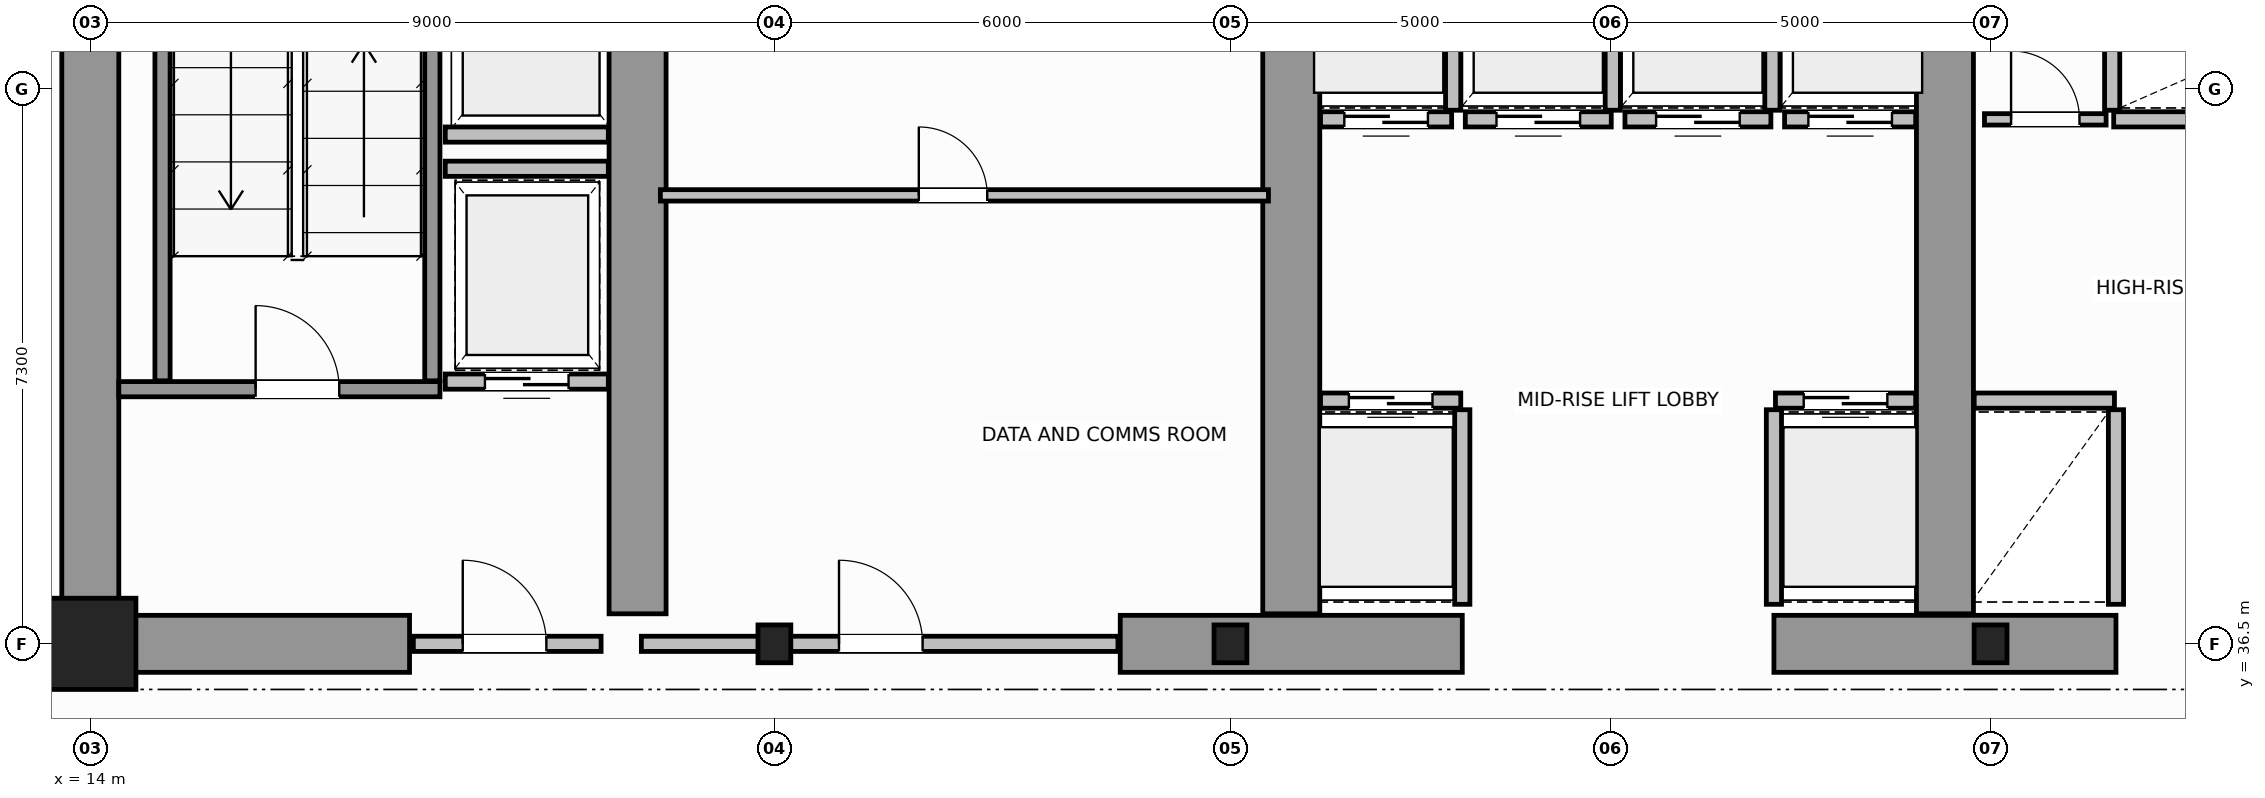
"""IFC4 building model, lengths in metres.
Left out: names, types, materials, properties, quantities, classifications, styles, units other than length and angle.
Written with IfcOpenShell. Run it as: python <this file> out.ifc"""

import sys

from ifc_helpers import new_model, si_unit, direction, frame, frame_2d, origin, origin_2d, place, context, subcontext, project, spatial, rectangle, i_section, extrude, source, transform, mapped, element, fill, save


model = new_model("IFC4")
c1 = context("Model", 3, precision=1e-05, world=origin(), true_north=direction((0.0, 1.0)))
c2 = subcontext(c1, "Body", "Model", "MODEL_VIEW")
j1 = project(units=[si_unit("LENGTHUNIT", "METRE"), si_unit("PLANEANGLEUNIT", "RADIAN")], contexts=[c1])
p1 = place(None, origin())
s1 = spatial("IfcSite", under=j1, at=p1, CompositionType="ELEMENT")
p2 = place(p1, origin())
s2 = spatial("IfcBuilding", under=s1, at=p2, CompositionType="ELEMENT")
p3 = place(p2, frame((0.0, 0.0, 141.4)))
s3 = spatial("IfcBuildingStorey", under=s2, at=p3, CompositionType="ELEMENT", Elevation=141.4)
m1 = source(origin(), c2, "Body", "SweptSolid", [
    extrude(rectangle(XDim=1.2, YDim=1.2, at=origin_2d()), origin(), (0.0, 0.0, 1.0), 3.8),
])
p4 = place(p3, frame((14.0, 36.5, 0.0), z_axis=(0.0, 0.0, 1.0), x_axis=(1.0, 0.0, 0.0)))
e1 = element("IfcColumn", 1, at=p4, inside=s3, PredefinedType="COLUMN", context=c2, shape_type="MappedRepresentation", body=[
    mapped(m1, transform((0.0, 0.0, 0.0), scale=1.0)),
])
m2 = source(origin(), c2, "Body", "SweptSolid", [
    extrude(i_section(OverallWidth=0.432, OverallDepth=0.498, WebThickness=0.055, FlangeThickness=0.068, FilletRadius=0.015, at=origin_2d()), origin(), (0.0, 0.0, 1.0), 3.8),
])
for number, where, z_axis, x_axis in (
    (2, (23.0, 36.5, 0.0), (0.0, 0.0, 1.0), (1.0, 0.0, 0.0)),
    (3, (29.0, 36.5, 0.0), (0.0, 0.0, 1.0), (1.0, 0.0, 0.0)),
    (4, (39.0, 36.5, 0.0), (0.0, 0.0, 1.0), (1.0, 0.0, 0.0)),
):
    element("IfcColumn", number, at=place(p3, frame(where, z_axis=z_axis, x_axis=x_axis)), inside=s3, PredefinedType="COLUMN", context=c2, shape_type="MappedRepresentation", body=[
        mapped(m2, transform((0.0, 0.0, 0.0), scale=1.0)),
    ])
p5 = place(p3, frame((14.0, 36.5, 0.0), z_axis=(0.0, 0.0, 1.0), x_axis=(0.0, 1.0, 0.0)))
e5 = element("IfcWall", 5, at=p5, inside=s3, PredefinedType="SHEAR", context=c2, shape_type="SweptSolid", body=[
    extrude(rectangle(XDim=14.5, YDim=0.75, at=frame_2d((7.25, 0.0))), origin(), (0.0, 0.0, 1.0), 3.8),
])
p6 = place(p3, frame((14.395, 36.5, 0.0), z_axis=(0.0, 0.0, 1.0), x_axis=(1.0, 0.0, 0.0)))
e6 = element("IfcWall", 6, at=p6, inside=s3, PredefinedType="SHEAR", context=c2, shape_type="SweptSolid", body=[
    extrude(rectangle(XDim=3.805, YDim=0.75, at=frame_2d((1.902, 0.0))), origin(), (0.0, 0.0, 1.0), 2.38),
])
for number, where, z_axis, x_axis in (
    (7, (27.55, 36.5, 0.0), (0.0, 0.0, 1.0), (1.0, 0.0, 0.0)),
    (8, (36.15, 36.5, 0.0), (0.0, 0.0, 1.0), (1.0, 0.0, 0.0)),
):
    element("IfcWall", number, at=place(p3, frame(where, z_axis=z_axis, x_axis=x_axis)), inside=s3, PredefinedType="SHEAR", context=c2, shape_type="SweptSolid", body=[
        extrude(rectangle(XDim=4.5, YDim=0.75, at=frame_2d((2.25, 0.0))), origin(), (0.0, 0.0, 1.0), 3.8),
    ])
for number, where, z_axis, x_axis in (
    (9, (21.2, 36.895, 0.0), (0.0, 0.0, 1.0), (0.0, 1.0, 0.0)),
    (10, (29.8, 36.895, 0.0), (0.0, 0.0, 1.0), (0.0, 1.0, 0.0)),
    (11, (38.4, 36.895, 0.0), (0.0, 0.0, 1.0), (0.0, 1.0, 0.0)),
):
    element("IfcWall", number, at=place(p3, frame(where, z_axis=z_axis, x_axis=x_axis)), inside=s3, PredefinedType="SHEAR", context=c2, shape_type="SweptSolid", body=[
        extrude(rectangle(XDim=9.305, YDim=0.75, at=frame_2d((4.652, 0.0))), origin(), (0.0, 0.0, 1.0), 3.8),
    ])
p7 = place(p3, frame((14.375, 39.85, 0.0), z_axis=(0.0, 0.0, 1.0), x_axis=(1.0, 0.0, 0.0)))
e12 = element("IfcWall", 12, at=p7, inside=s3, PredefinedType="SOLIDWALL", context=c2, shape_type="SweptSolid", body=[
    extrude(rectangle(XDim=4.225, YDim=0.2, at=frame_2d((2.113, 0.0))), origin(), (0.0, 0.0, 1.0), 3.8),
])
p8 = place(p7, frame((1.8, 0.0, 0.0)))
e13 = element("IfcOpeningElement", 13, at=p8, cuts=e12, PredefinedType="OPENING", context=c2, shape_type="SweptSolid", body=[
    extrude(rectangle(XDim=1.1, YDim=2.15, at=frame_2d((0.55, 1.075))), frame((0.0, 0.11, 0.0), z_axis=(0.0, -1.0, 0.0), x_axis=(1.0, 0.0, 0.0)), (0.0, 0.0, 1.0), 0.22),
])
for number, where, z_axis, x_axis in (
    (14, (14.95, 39.96, 0.0), (0.0, 0.0, 1.0), (0.0, 1.0, 0.0)),
    (15, (18.5, 39.96, 0.0), (0.0, 0.0, 1.0), (0.0, 1.0, 0.0)),
):
    element("IfcWall", number, at=place(p3, frame(where, z_axis=z_axis, x_axis=x_axis)), inside=s3, PredefinedType="SOLIDWALL", context=c2, shape_type="SweptSolid", body=[
        extrude(rectangle(XDim=9.93, YDim=0.2, at=frame_2d((4.965, 0.0))), origin(), (0.0, 0.0, 1.0), 3.8),
    ])
p9 = place(p3, frame((18.25, 36.5, 0.0), z_axis=(0.0, 0.0, 1.0), x_axis=(1.0, 0.0, 0.0)))
e16 = element("IfcWall", 16, at=p9, inside=s3, PredefinedType="SOLIDWALL", context=c2, shape_type="SweptSolid", body=[
    extrude(rectangle(XDim=2.47, YDim=0.2, at=frame_2d((1.235, 0.0))), origin(), (0.0, 0.0, 1.0), 2.37),
])
p10 = place(p9, frame((0.65, 0.0, 0.0)))
e17 = element("IfcOpeningElement", 17, at=p10, cuts=e16, PredefinedType="OPENING", context=c2, shape_type="SweptSolid", body=[
    extrude(rectangle(XDim=1.1, YDim=2.15, at=frame_2d((0.55, 1.075))), frame((0.0, 0.11, 0.0), z_axis=(0.0, -1.0, 0.0), x_axis=(1.0, 0.0, 0.0)), (0.0, 0.0, 1.0), 0.22),
])
p11 = place(p3, frame((30.185, 39.7, 0.0), z_axis=(0.0, 0.0, 1.0), x_axis=(1.0, 0.0, 0.0)))
e18 = element("IfcWall", 18, at=p11, inside=s3, PredefinedType="SOLIDWALL", context=c2, shape_type="SweptSolid", body=[
    extrude(rectangle(XDim=1.845, YDim=0.2, at=frame_2d((0.922, 0.0))), origin(), (0.0, 0.0, 1.0), 3.58),
])
p12 = place(p11, frame((0.373, 0.0, 0.0)))
e19 = element("IfcOpeningElement", 19, at=p12, cuts=e18, PredefinedType="OPENING", context=c2, shape_type="SweptSolid", body=[
    extrude(rectangle(XDim=1.1, YDim=2.15, at=frame_2d((0.55, 1.075))), frame((0.0, 0.11, 0.0), z_axis=(0.0, -1.0, 0.0), x_axis=(1.0, 0.0, 0.0)), (0.0, 0.0, 1.0), 0.22),
])
p13 = place(p3, frame((32.05, 37.02, 0.0), z_axis=(0.0, 0.0, 1.0), x_axis=(0.0, 1.0, 0.0)))
e20 = element("IfcWall", 20, at=p13, inside=s3, PredefinedType="SOLIDWALL", context=c2, shape_type="SweptSolid", body=[
    extrude(rectangle(XDim=2.56, YDim=0.2, at=frame_2d((1.28, 0.0))), origin(), (0.0, 0.0, 1.0), 3.58),
])
p14 = place(p3, frame((36.17, 39.7, 0.0), z_axis=(0.0, 0.0, 1.0), x_axis=(1.0, 0.0, 0.0)))
e21 = element("IfcWall", 21, at=p14, inside=s3, PredefinedType="SOLIDWALL", context=c2, shape_type="SweptSolid", body=[
    extrude(rectangle(XDim=1.845, YDim=0.2, at=frame_2d((0.922, 0.0))), origin(), (0.0, 0.0, 1.0), 3.58),
])
p15 = place(p14, frame((0.372, 0.0, 0.0)))
e22 = element("IfcOpeningElement", 22, at=p15, cuts=e21, PredefinedType="OPENING", context=c2, shape_type="SweptSolid", body=[
    extrude(rectangle(XDim=1.1, YDim=2.15, at=frame_2d((0.55, 1.075))), frame((0.0, 0.11, 0.0), z_axis=(0.0, -1.0, 0.0), x_axis=(1.0, 0.0, 0.0)), (0.0, 0.0, 1.0), 0.22),
])
p16 = place(p3, frame((36.15, 37.02, 0.0), z_axis=(0.0, 0.0, 1.0), x_axis=(0.0, 1.0, 0.0)))
e23 = element("IfcWall", 23, at=p16, inside=s3, PredefinedType="SOLIDWALL", context=c2, shape_type="SweptSolid", body=[
    extrude(rectangle(XDim=2.56, YDim=0.2, at=frame_2d((1.28, 0.0))), origin(), (0.0, 0.0, 1.0), 3.58),
])
p17 = place(p3, frame((30.185, 43.4, 0.0), z_axis=(0.0, 0.0, 1.0), x_axis=(1.0, 0.0, 0.0)))
e24 = element("IfcWall", 24, at=p17, inside=s3, PredefinedType="SOLIDWALL", context=c2, shape_type="SweptSolid", body=[
    extrude(rectangle(XDim=1.725, YDim=0.2, at=frame_2d((0.862, 0.0))), origin(), (0.0, 0.0, 1.0), 3.58),
])
p18 = place(p17, frame((0.313, 0.0, 0.0)))
e25 = element("IfcOpeningElement", 25, at=p18, cuts=e24, PredefinedType="OPENING", context=c2, shape_type="SweptSolid", body=[
    extrude(rectangle(XDim=1.1, YDim=2.15, at=frame_2d((0.55, 1.075))), frame((0.0, 0.11, 0.0), z_axis=(0.0, -1.0, 0.0), x_axis=(1.0, 0.0, 0.0)), (0.0, 0.0, 1.0), 0.22),
])
p19 = place(p3, frame((31.93, 43.52, 0.0), z_axis=(0.0, 0.0, 1.0), x_axis=(0.0, 1.0, 0.0)))
e26 = element("IfcWall", 26, at=p19, inside=s3, PredefinedType="SOLIDWALL", context=c2, shape_type="SweptSolid", body=[
    extrude(rectangle(XDim=2.56, YDim=0.2, at=frame_2d((1.28, 0.0))), origin(), (0.0, 0.0, 1.0), 3.58),
])
p20 = place(p3, frame((32.09, 43.4, 0.0), z_axis=(0.0, 0.0, 1.0), x_axis=(1.0, 0.0, 0.0)))
e27 = element("IfcWall", 27, at=p20, inside=s3, PredefinedType="SOLIDWALL", context=c2, shape_type="SweptSolid", body=[
    extrude(rectangle(XDim=1.92, YDim=0.2, at=frame_2d((0.96, 0.0))), origin(), (0.0, 0.0, 1.0), 3.58),
])
p21 = place(p20, frame((0.41, 0.0, 0.0)))
e28 = element("IfcOpeningElement", 28, at=p21, cuts=e27, PredefinedType="OPENING", context=c2, shape_type="SweptSolid", body=[
    extrude(rectangle(XDim=1.1, YDim=2.15, at=frame_2d((0.55, 1.075))), frame((0.0, 0.11, 0.0), z_axis=(0.0, -1.0, 0.0), x_axis=(1.0, 0.0, 0.0)), (0.0, 0.0, 1.0), 0.22),
])
p22 = place(p3, frame((34.03, 43.52, 0.0), z_axis=(0.0, 0.0, 1.0), x_axis=(0.0, 1.0, 0.0)))
e29 = element("IfcWall", 29, at=p22, inside=s3, PredefinedType="SOLIDWALL", context=c2, shape_type="SweptSolid", body=[
    extrude(rectangle(XDim=2.56, YDim=0.2, at=frame_2d((1.28, 0.0))), origin(), (0.0, 0.0, 1.0), 3.58),
])
p23 = place(p3, frame((34.19, 43.4, 0.0), z_axis=(0.0, 0.0, 1.0), x_axis=(1.0, 0.0, 0.0)))
e30 = element("IfcWall", 30, at=p23, inside=s3, PredefinedType="SOLIDWALL", context=c2, shape_type="SweptSolid", body=[
    extrude(rectangle(XDim=1.92, YDim=0.2, at=frame_2d((0.96, 0.0))), origin(), (0.0, 0.0, 1.0), 3.58),
])
p24 = place(p23, frame((0.41, 0.0, 0.0)))
e31 = element("IfcOpeningElement", 31, at=p24, cuts=e30, PredefinedType="OPENING", context=c2, shape_type="SweptSolid", body=[
    extrude(rectangle(XDim=1.1, YDim=2.15, at=frame_2d((0.55, 1.075))), frame((0.0, 0.11, 0.0), z_axis=(0.0, -1.0, 0.0), x_axis=(1.0, 0.0, 0.0)), (0.0, 0.0, 1.0), 0.22),
])
p25 = place(p3, frame((36.13, 43.52, 0.0), z_axis=(0.0, 0.0, 1.0), x_axis=(0.0, 1.0, 0.0)))
e32 = element("IfcWall", 32, at=p25, inside=s3, PredefinedType="SOLIDWALL", context=c2, shape_type="SweptSolid", body=[
    extrude(rectangle(XDim=2.56, YDim=0.2, at=frame_2d((1.28, 0.0))), origin(), (0.0, 0.0, 1.0), 3.58),
])
p26 = place(p3, frame((36.29, 43.4, 0.0), z_axis=(0.0, 0.0, 1.0), x_axis=(1.0, 0.0, 0.0)))
e33 = element("IfcWall", 33, at=p26, inside=s3, PredefinedType="SOLIDWALL", context=c2, shape_type="SweptSolid", body=[
    extrude(rectangle(XDim=1.725, YDim=0.2, at=frame_2d((0.862, 0.0))), origin(), (0.0, 0.0, 1.0), 3.58),
])
p27 = place(p26, frame((0.313, 0.0, 0.0)))
e34 = element("IfcOpeningElement", 34, at=p27, cuts=e33, PredefinedType="OPENING", context=c2, shape_type="SweptSolid", body=[
    extrude(rectangle(XDim=1.1, YDim=2.15, at=frame_2d((0.55, 1.075))), frame((0.0, 0.11, 0.0), z_axis=(0.0, -1.0, 0.0), x_axis=(1.0, 0.0, 0.0)), (0.0, 0.0, 1.0), 0.22),
])
p28 = place(p3, frame((38.785, 39.7, 0.0), z_axis=(0.0, 0.0, 1.0), x_axis=(1.0, 0.0, 0.0)))
e35 = element("IfcWall", 35, at=p28, inside=s3, PredefinedType="SOLIDWALL", context=c2, shape_type="SweptSolid", body=[
    extrude(rectangle(XDim=1.845, YDim=0.2, at=frame_2d((0.922, 0.0))), origin(), (0.0, 0.0, 1.0), 3.58),
])
p29 = place(p3, frame((40.65, 37.02, 0.0), z_axis=(0.0, 0.0, 1.0), x_axis=(0.0, 1.0, 0.0)))
e36 = element("IfcWall", 36, at=p29, inside=s3, PredefinedType="SOLIDWALL", context=c2, shape_type="SweptSolid", body=[
    extrude(rectangle(XDim=2.56, YDim=0.2, at=frame_2d((1.28, 0.0))), origin(), (0.0, 0.0, 1.0), 3.58),
])
p30 = place(p3, frame((40.62, 43.4, 0.0), z_axis=(0.0, 0.0, 1.0), x_axis=(1.0, 0.0, 0.0)))
e37 = element("IfcWall", 37, at=p30, inside=s3, PredefinedType="SOLIDWALL", context=c2, shape_type="SweptSolid", body=[
    extrude(rectangle(XDim=1.86, YDim=0.2, at=frame_2d((0.93, 0.0))), origin(), (0.0, 0.0, 1.0), 3.58),
])
p31 = place(p3, frame((40.6, 43.52, 0.0), z_axis=(0.0, 0.0, 1.0), x_axis=(0.0, 1.0, 0.0)))
e38 = element("IfcWall", 38, at=p31, inside=s3, PredefinedType="SOLIDWALL", context=c2, shape_type="SweptSolid", body=[
    extrude(rectangle(XDim=2.56, YDim=0.2, at=frame_2d((1.28, 0.0))), origin(), (0.0, 0.0, 1.0), 3.58),
])
p32 = place(p3, frame((18.67, 43.2, 0.0), z_axis=(0.0, 0.0, 1.0), x_axis=(1.0, 0.0, 0.0)))
e39 = element("IfcWall", 39, at=p32, inside=s3, PredefinedType="SOLIDWALL", context=c2, shape_type="SweptSolid", body=[
    extrude(rectangle(XDim=2.145, YDim=0.2, at=frame_2d((1.073, 0.0))), origin(), (0.0, 0.0, 1.0), 3.58),
])
p33 = place(p3, frame((18.67, 39.95, 0.0), z_axis=(0.0, 0.0, 1.0), x_axis=(1.0, 0.0, 0.0)))
e40 = element("IfcWall", 40, at=p33, inside=s3, PredefinedType="SOLIDWALL", context=c2, shape_type="SweptSolid", body=[
    extrude(rectangle(XDim=2.145, YDim=0.2, at=frame_2d((1.073, 0.0))), origin(), (0.0, 0.0, 1.0), 3.58),
])
p34 = place(p33, frame((0.522, 0.0, 0.0)))
e41 = element("IfcOpeningElement", 41, at=p34, cuts=e40, PredefinedType="OPENING", context=c2, shape_type="SweptSolid", body=[
    extrude(rectangle(XDim=1.1, YDim=2.15, at=frame_2d((0.55, 1.075))), frame((0.0, 0.11, 0.0), z_axis=(0.0, -1.0, 0.0), x_axis=(1.0, 0.0, 0.0)), (0.0, 0.0, 1.0), 0.22),
])
p35 = place(p3, frame((18.67, 42.75, 0.0), z_axis=(0.0, 0.0, 1.0), x_axis=(1.0, 0.0, 0.0)))
e42 = element("IfcWall", 42, at=p35, inside=s3, PredefinedType="SOLIDWALL", context=c2, shape_type="SweptSolid", body=[
    extrude(rectangle(XDim=2.145, YDim=0.2, at=frame_2d((1.073, 0.0))), origin(), (0.0, 0.0, 1.0), 3.58),
])
p36 = place(p3, frame((21.25, 36.5, 0.0), z_axis=(0.0, 0.0, 1.0), x_axis=(1.0, 0.0, 0.0)))
e43 = element("IfcWall", 43, at=p36, inside=s3, PredefinedType="SOLIDWALL", context=c2, shape_type="SweptSolid", body=[
    extrude(rectangle(XDim=6.27, YDim=0.2, at=frame_2d((3.135, 0.0))), origin(), (0.0, 0.0, 1.0), 2.37),
])
p37 = place(p36, frame((2.6, 0.0, 0.0)))
e44 = element("IfcOpeningElement", 44, at=p37, cuts=e43, PredefinedType="OPENING", context=c2, shape_type="SweptSolid", body=[
    extrude(rectangle(XDim=1.1, YDim=2.15, at=frame_2d((0.55, 1.075))), frame((0.0, 0.11, 0.0), z_axis=(0.0, -1.0, 0.0), x_axis=(1.0, 0.0, 0.0)), (0.0, 0.0, 1.0), 0.22),
])
p38 = place(p3, frame((21.5, 42.4, 0.0), z_axis=(0.0, 0.0, 1.0), x_axis=(1.0, 0.0, 0.0)))
e45 = element("IfcWall", 45, at=p38, inside=s3, PredefinedType="PARTITIONING", context=c2, shape_type="SweptSolid", body=[
    extrude(rectangle(XDim=8.0, YDim=0.15, at=frame_2d((4.0, 0.0))), origin(), (0.0, 0.0, 1.0), 3.58),
])
p39 = place(p38, frame((3.4, 0.0, 0.0)))
e46 = element("IfcOpeningElement", 46, at=p39, cuts=e45, PredefinedType="OPENING", context=c2, shape_type="SweptSolid", body=[
    extrude(rectangle(XDim=0.9, YDim=2.1, at=frame_2d((0.45, 1.05))), frame((0.0, 0.085, 0.0), z_axis=(0.0, -1.0, 0.0), x_axis=(1.0, 0.0, 0.0)), (0.0, 0.0, 1.0), 0.17),
])
p40 = place(p3, frame((38.92, 43.4, 0.0), z_axis=(0.0, 0.0, 1.0), x_axis=(1.0, 0.0, 0.0)))
e47 = element("IfcWall", 47, at=p40, inside=s3, PredefinedType="PARTITIONING", context=c2, shape_type="SweptSolid", body=[
    extrude(rectangle(XDim=1.6, YDim=0.15, at=frame_2d((0.8, 0.0))), origin(), (0.0, 0.0, 1.0), 3.58),
])
p41 = place(p40, frame((0.35, 0.0, 0.0)))
e48 = element("IfcOpeningElement", 48, at=p41, cuts=e47, PredefinedType="OPENING", context=c2, shape_type="SweptSolid", body=[
    extrude(rectangle(XDim=0.9, YDim=2.1, at=frame_2d((0.45, 1.05))), frame((0.0, 0.085, 0.0), z_axis=(0.0, -1.0, 0.0), x_axis=(1.0, 0.0, 0.0)), (0.0, 0.0, 1.0), 0.17),
])
p42 = place(p3, frame((7.263, 36.48, 0.0), z_axis=(0.0, 0.0, 1.0), x_axis=(1.0, 0.0, 0.0)))
e49 = element("IfcWall", 49, at=p42, inside=s3, PredefinedType="PARTITIONING", context=c2, shape_type="SweptSolid", body=[
    extrude(rectangle(XDim=6.677, YDim=0.12, at=frame_2d((3.339, 0.0))), origin(), (0.0, 0.0, 1.0), 2.87),
])
p43 = place(p42, frame((2.889, 0.0, 0.0)))
e50 = element("IfcOpeningElement", 50, at=p43, cuts=e49, PredefinedType="OPENING", context=c2, shape_type="SweptSolid", body=[
    extrude(rectangle(XDim=0.9, YDim=2.15, at=frame_2d((0.45, 1.075))), frame((0.0, 0.07, 0.0), z_axis=(0.0, -1.0, 0.0), x_axis=(1.0, 0.0, 0.0)), (0.0, 0.0, 1.0), 0.14),
])
m3 = source(origin(), c2, "Body", "SweptSolid", [
    extrude(rectangle(XDim=1.1, YDim=2.15, at=frame_2d((0.55, 1.075))), frame((0.0, 0.025, 0.0), z_axis=(0.0, -1.0, 0.0), x_axis=(1.0, 0.0, 0.0)), (0.0, 0.0, 1.0), 0.05),
])
p44 = place(p8, origin())
e51 = element("IfcDoor", 51, at=p44, inside=s3, OperationType="SINGLE_SWING_LEFT", PredefinedType="DOOR", context=c2, shape_type="MappedRepresentation", body=[
    mapped(m3, transform((0.0, 0.0, 0.0), scale=1.0)),
])
fill(e13, e51)
p45 = place(p10, origin())
e52 = element("IfcDoor", 52, at=p45, inside=s3, OperationType="SINGLE_SWING_RIGHT", PredefinedType="DOOR", context=c2, shape_type="MappedRepresentation", body=[
    mapped(m3, transform((0.0, 0.0, 0.0), scale=1.0)),
])
fill(e17, e52)
p46 = place(p12, origin())
e53 = element("IfcDoor", 53, at=p46, inside=s3, OperationType="DOUBLE_DOOR_SLIDING", PredefinedType="DOOR", context=c2, shape_type="MappedRepresentation", body=[
    mapped(m3, transform((0.0, 0.0, 0.0), scale=1.0)),
])
fill(e19, e53)
p47 = place(p15, origin())
e54 = element("IfcDoor", 54, at=p47, inside=s3, OperationType="DOUBLE_DOOR_SLIDING", PredefinedType="DOOR", context=c2, shape_type="MappedRepresentation", body=[
    mapped(m3, transform((0.0, 0.0, 0.0), scale=1.0)),
])
fill(e22, e54)
p48 = place(p18, origin())
e55 = element("IfcDoor", 55, at=p48, inside=s3, OperationType="DOUBLE_DOOR_SLIDING", PredefinedType="DOOR", context=c2, shape_type="MappedRepresentation", body=[
    mapped(m3, transform((0.0, 0.0, 0.0), scale=1.0)),
])
fill(e25, e55)
p49 = place(p21, origin())
e56 = element("IfcDoor", 56, at=p49, inside=s3, OperationType="DOUBLE_DOOR_SLIDING", PredefinedType="DOOR", context=c2, shape_type="MappedRepresentation", body=[
    mapped(m3, transform((0.0, 0.0, 0.0), scale=1.0)),
])
fill(e28, e56)
p50 = place(p24, origin())
e57 = element("IfcDoor", 57, at=p50, inside=s3, OperationType="DOUBLE_DOOR_SLIDING", PredefinedType="DOOR", context=c2, shape_type="MappedRepresentation", body=[
    mapped(m3, transform((0.0, 0.0, 0.0), scale=1.0)),
])
fill(e31, e57)
p51 = place(p27, origin())
e58 = element("IfcDoor", 58, at=p51, inside=s3, OperationType="DOUBLE_DOOR_SLIDING", PredefinedType="DOOR", context=c2, shape_type="MappedRepresentation", body=[
    mapped(m3, transform((0.0, 0.0, 0.0), scale=1.0)),
])
fill(e34, e58)
p52 = place(p34, origin())
e59 = element("IfcDoor", 59, at=p52, inside=s3, OperationType="DOUBLE_DOOR_SLIDING", PredefinedType="DOOR", context=c2, shape_type="MappedRepresentation", body=[
    mapped(m3, transform((0.0, 0.0, 0.0), scale=1.0)),
])
fill(e41, e59)
p53 = place(p37, origin())
e60 = element("IfcDoor", 60, at=p53, inside=s3, OperationType="SINGLE_SWING_LEFT", PredefinedType="DOOR", context=c2, shape_type="MappedRepresentation", body=[
    mapped(m3, transform((0.0, 0.0, 0.0), scale=1.0)),
])
fill(e44, e60)
m4 = source(origin(), c2, "Body", "SweptSolid", [
    extrude(rectangle(XDim=0.9, YDim=2.1, at=frame_2d((0.45, 1.05))), frame((0.0, 0.025, 0.0), z_axis=(0.0, -1.0, 0.0), x_axis=(1.0, 0.0, 0.0)), (0.0, 0.0, 1.0), 0.05),
])
p54 = place(p39, origin())
e61 = element("IfcDoor", 61, at=p54, inside=s3, OperationType="SINGLE_SWING_RIGHT", PredefinedType="DOOR", context=c2, shape_type="MappedRepresentation", body=[
    mapped(m4, transform((0.0, 0.0, 0.0), scale=1.0)),
])
fill(e46, e61)
p55 = place(p41, origin())
e62 = element("IfcDoor", 62, at=p55, inside=s3, OperationType="SINGLE_SWING_LEFT", PredefinedType="DOOR", context=c2, shape_type="MappedRepresentation", body=[
    mapped(m4, transform((0.0, 0.0, 0.0), scale=1.0)),
])
fill(e48, e62)
save(model, sys.argv[1])
